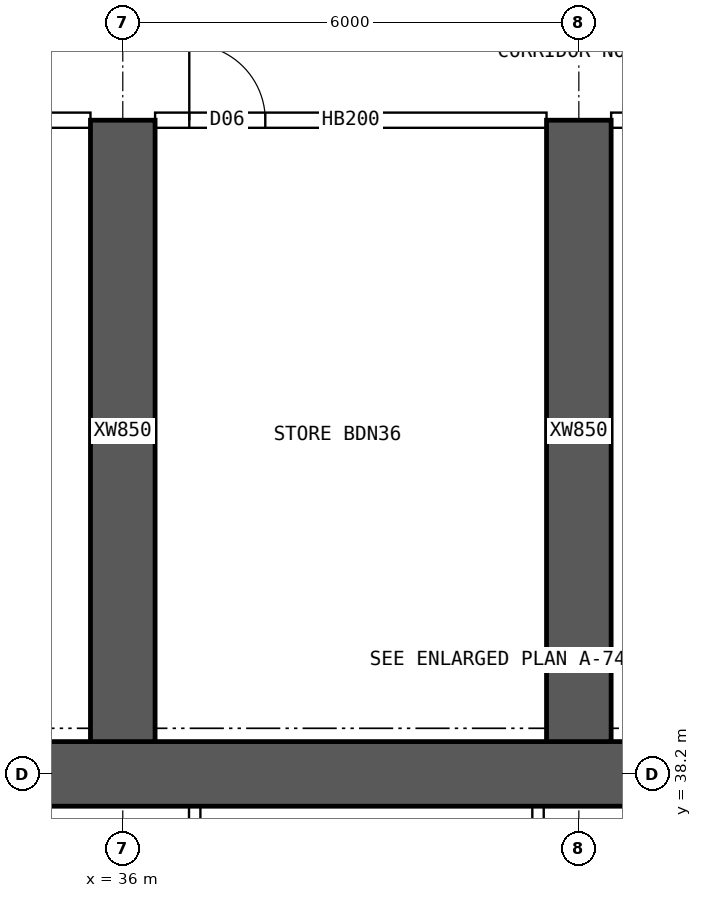
"""IFC4 building model, lengths in metres.
Left out: names, types, materials, properties, quantities, classifications, styles, units other than length and angle.
Written with IfcOpenShell. Run it as: python <this file> out.ifc"""

import sys

from ifc_helpers import new_model, si_unit, direction, frame, frame_2d, origin, place, context, subcontext, project, spatial, rectangle, extrude, element, fill, save


model = new_model("IFC4")
c1 = context("Model", 3, precision=1e-05, world=origin(), true_north=direction((0.0, 1.0)))
c2 = subcontext(c1, "Body", "Model", "MODEL_VIEW")
j1 = project(units=[si_unit("LENGTHUNIT", "METRE"), si_unit("PLANEANGLEUNIT", "RADIAN")], contexts=[c1])
p1 = place(None, origin())
s1 = spatial("IfcSite", under=j1, at=p1, CompositionType="ELEMENT")
p2 = place(p1, origin())
s2 = spatial("IfcBuilding", under=s1, at=p2, CompositionType="ELEMENT")
p3 = place(p2, frame((0.0, 0.0, 163.6)))
s3 = spatial("IfcBuildingStorey", under=s2, at=p3, CompositionType="ELEMENT", Elevation=163.6)
p4 = place(p3, frame((18.0, 38.2, 0.0), z_axis=(0.0, 0.0, 1.0), x_axis=(1.0, 0.0, 0.0)))
e1 = element("IfcWall", 1, at=p4, inside=s3, PredefinedType="SHEAR", context=c2, shape_type="SweptSolid", body=[
    extrude(rectangle(XDim=48.0, YDim=0.85, at=frame_2d((24.0, 0.0))), origin(), (0.0, 0.0, 1.0), 3.75),
])
for number, where, z_axis, x_axis in (
    (2, (36.0, 38.625, 0.0), (0.0, 0.0, 1.0), (0.0, 1.0, 0.0)),
    (3, (42.0, 38.625, 0.0), (0.0, 0.0, 1.0), (0.0, 1.0, 0.0)),
):
    element("IfcWall", number, at=place(p3, frame(where, z_axis=z_axis, x_axis=x_axis)), inside=s3, PredefinedType="SHEAR", context=c2, shape_type="SweptSolid", body=[
        extrude(rectangle(XDim=8.175, YDim=0.85, at=frame_2d((4.087, 0.0))), origin(), (0.0, 0.0, 1.0), 3.75),
    ])
for number, where, z_axis, x_axis in (
    (4, (36.946, 34.75, 0.0), (0.0, 0.0, 1.0), (0.0, 1.0, 0.0)),
    (5, (41.463, 34.75, 0.0), (0.0, 0.0, 1.0), (0.0, 1.0, 0.0)),
):
    element("IfcWall", number, at=place(p3, frame(where, z_axis=z_axis, x_axis=x_axis)), inside=s3, PredefinedType="SOLIDWALL", context=c2, shape_type="SweptSolid", body=[
        extrude(rectangle(XDim=3.025, YDim=0.15, at=frame_2d((1.512, 0.0))), origin(), (0.0, 0.0, 1.0), 3.5),
    ])
p5 = place(p3, frame((30.425, 46.8, 0.0), z_axis=(0.0, 0.0, 1.0), x_axis=(1.0, 0.0, 0.0)))
e6 = element("IfcWall", 6, at=p5, inside=s3, PredefinedType="SOLIDWALL", context=c2, shape_type="SweptSolid", body=[
    extrude(rectangle(XDim=5.15, YDim=0.2, at=frame_2d((2.575, 0.0))), origin(), (0.0, 0.0, 1.0), 3.5),
])
p6 = place(p5, frame((0.35, 0.0, 0.0)))
e7 = element("IfcOpeningElement", 7, at=p6, cuts=e6, PredefinedType="OPENING", context=c2, shape_type="SweptSolid", body=[
    extrude(rectangle(XDim=0.9, YDim=2.1, at=frame_2d((0.45, 1.05))), frame((0.0, 0.11, 0.0), z_axis=(0.0, -1.0, 0.0), x_axis=(1.0, 0.0, 0.0)), (0.0, 0.0, 1.0), 0.22),
])
p7 = place(p5, frame((2.355, 0.0, 0.0)))
e8 = element("IfcOpeningElement", 8, at=p7, cuts=e6, PredefinedType="OPENING", context=c2, shape_type="SweptSolid", body=[
    extrude(rectangle(XDim=0.9, YDim=2.1, at=frame_2d((0.45, 1.05))), frame((0.0, 0.11, 0.0), z_axis=(0.0, -1.0, 0.0), x_axis=(1.0, 0.0, 0.0)), (0.0, 0.0, 1.0), 0.22),
])
p8 = place(p3, frame((36.425, 46.8, 0.0), z_axis=(0.0, 0.0, 1.0), x_axis=(1.0, 0.0, 0.0)))
e9 = element("IfcWall", 9, at=p8, inside=s3, PredefinedType="SOLIDWALL", context=c2, shape_type="SweptSolid", body=[
    extrude(rectangle(XDim=5.15, YDim=0.2, at=frame_2d((2.575, 0.0))), origin(), (0.0, 0.0, 1.0), 3.5),
])
p9 = place(p8, frame((0.45, 0.0, 0.0)))
e10 = element("IfcOpeningElement", 10, at=p9, cuts=e9, PredefinedType="OPENING", context=c2, shape_type="SweptSolid", body=[
    extrude(rectangle(XDim=1.0, YDim=2.1, at=frame_2d((0.5, 1.05))), frame((0.0, 0.11, 0.0), z_axis=(0.0, -1.0, 0.0), x_axis=(1.0, 0.0, 0.0)), (0.0, 0.0, 1.0), 0.22),
])
p10 = place(p3, frame((42.425, 46.8, 0.0), z_axis=(0.0, 0.0, 1.0), x_axis=(1.0, 0.0, 0.0)))
e11 = element("IfcWall", 11, at=p10, inside=s3, PredefinedType="SOLIDWALL", context=c2, shape_type="SweptSolid", body=[
    extrude(rectangle(XDim=5.15, YDim=0.2, at=frame_2d((2.575, 0.0))), origin(), (0.0, 0.0, 1.0), 3.5),
])
p11 = place(p10, frame((0.35, 0.0, 0.0)))
e12 = element("IfcOpeningElement", 12, at=p11, cuts=e11, PredefinedType="OPENING", context=c2, shape_type="SweptSolid", body=[
    extrude(rectangle(XDim=0.9, YDim=2.1, at=frame_2d((0.45, 1.05))), frame((0.0, 0.11, 0.0), z_axis=(0.0, -1.0, 0.0), x_axis=(1.0, 0.0, 0.0)), (0.0, 0.0, 1.0), 0.22),
])
p12 = place(p10, frame((4.005, 0.0, 0.0)))
e13 = element("IfcOpeningElement", 13, at=p12, cuts=e11, PredefinedType="OPENING", context=c2, shape_type="SweptSolid", body=[
    extrude(rectangle(XDim=0.9, YDim=2.1, at=frame_2d((0.45, 1.05))), frame((0.0, 0.11, 0.0), z_axis=(0.0, -1.0, 0.0), x_axis=(1.0, 0.0, 0.0)), (0.0, 0.0, 1.0), 0.22),
])
p13 = place(p9, origin())
e14 = element("IfcDoor", 14, at=p13, inside=s3, OperationType="SINGLE_SWING_LEFT", PredefinedType="DOOR", context=c2, shape_type="SweptSolid", body=[
    extrude(rectangle(XDim=1.0, YDim=2.1, at=frame_2d((0.5, 1.05))), frame((0.0, 0.025, 0.0), z_axis=(0.0, -1.0, 0.0), x_axis=(1.0, 0.0, 0.0)), (0.0, 0.0, 1.0), 0.05),
])
fill(e10, e14)
save(model, sys.argv[1])
